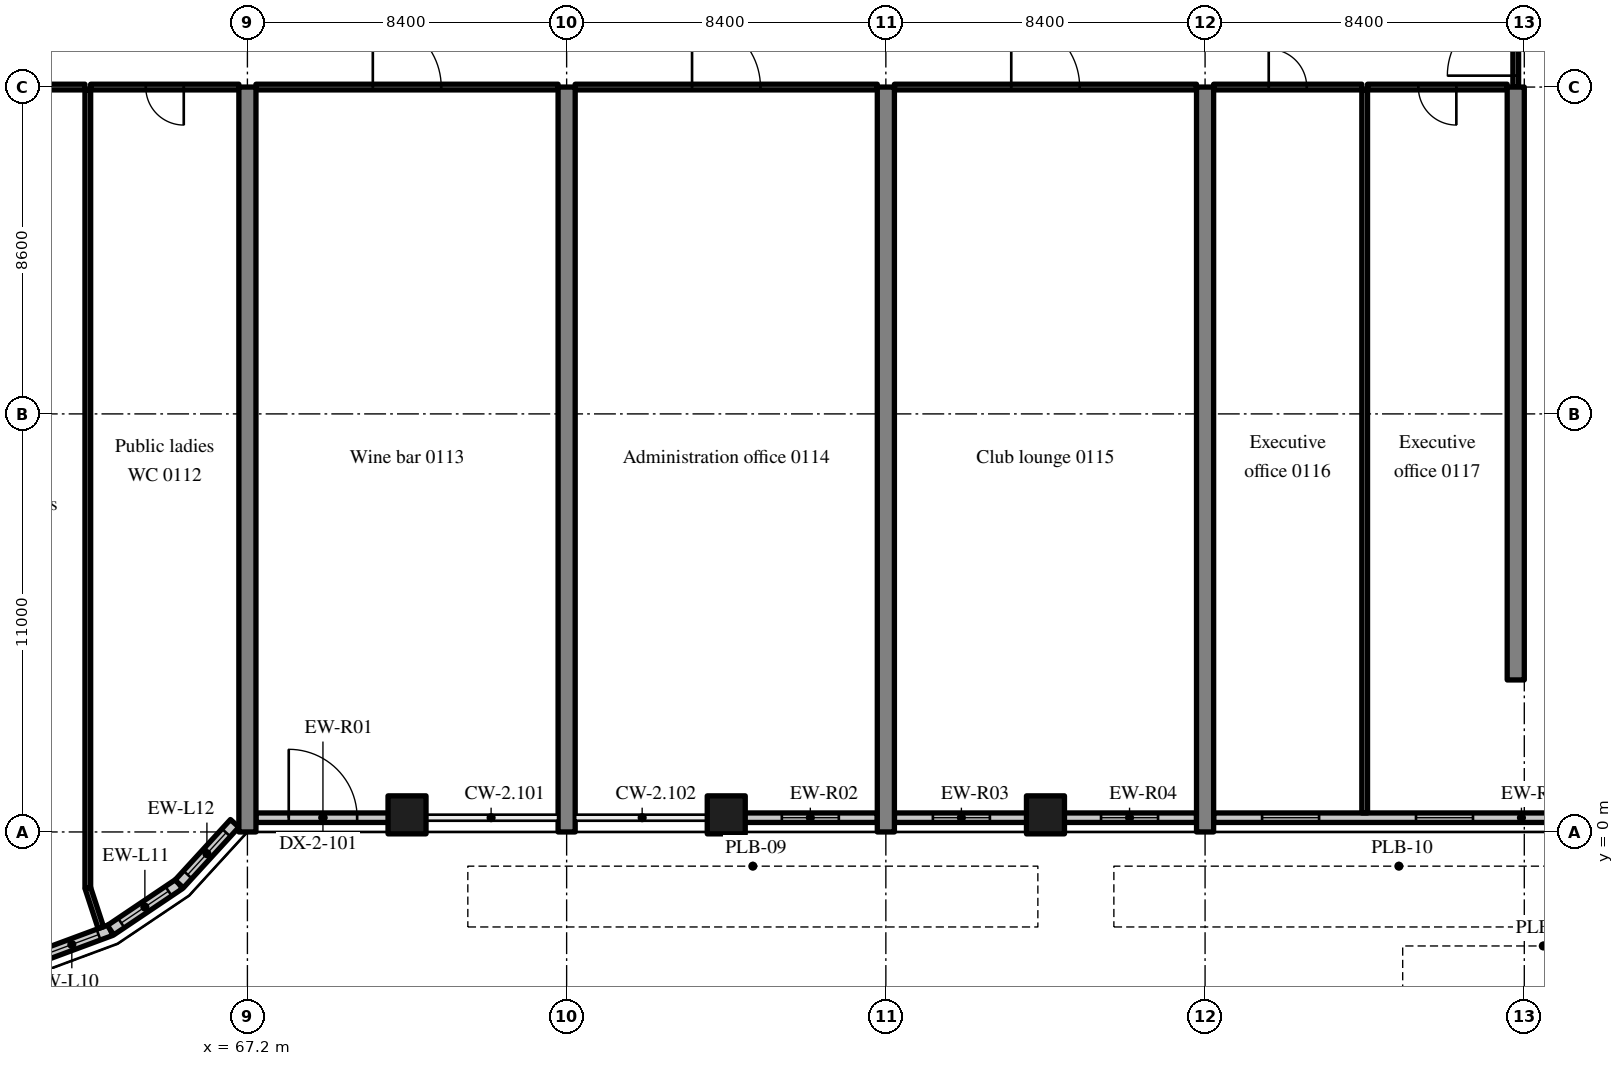
"""IFC4 building model, lengths in metres.
Left out: names, types, materials, properties, quantities, classifications, styles, units other than length and angle.
Written with IfcOpenShell. Run it as: python <this file> out.ifc"""

import sys

from ifc_helpers import new_model, si_unit, direction, frame, frame_2d, origin, origin_2d, place, context, subcontext, project, spatial, rectangle, extrude, source, transform, mapped, element, fill, save


model = new_model("IFC4")
c1 = context("Model", 3, precision=1e-05, world=origin(), true_north=direction((0.0, 1.0)))
c2 = subcontext(c1, "Body", "Model", "MODEL_VIEW")
j1 = project(units=[si_unit("LENGTHUNIT", "METRE"), si_unit("PLANEANGLEUNIT", "RADIAN")], contexts=[c1])
p1 = place(None, origin())
s1 = spatial("IfcSite", under=j1, at=p1, CompositionType="ELEMENT")
p2 = place(p1, origin())
s2 = spatial("IfcBuilding", under=s1, at=p2, CompositionType="ELEMENT")
p3 = place(p2, frame((0.0, 0.0, 6.0)))
s3 = spatial("IfcBuildingStorey", under=s2, at=p3, CompositionType="ELEMENT", Elevation=6.0)
m1 = source(origin(), c2, "Body", "SweptSolid", [
    extrude(rectangle(XDim=19.6, YDim=0.45, at=frame_2d((9.8, 0.0))), origin(), (0.0, 0.0, 1.0), 5.12),
])
for number, where, z_axis, x_axis in (
    (1, (67.2, 0.0, 0.0), (0.0, 0.0, 1.0), (0.0, 1.0, 0.0)),
    (2, (75.6, 0.0, 0.0), (0.0, 0.0, 1.0), (0.0, 1.0, 0.0)),
    (3, (84.0, 0.0, 0.0), (0.0, 0.0, 1.0), (0.0, 1.0, 0.0)),
    (4, (92.4, 0.0, 0.0), (0.0, 0.0, 1.0), (0.0, 1.0, 0.0)),
):
    element("IfcWall", number, at=place(p3, frame(where, z_axis=z_axis, x_axis=x_axis)), inside=s3, PredefinedType="SHEAR", context=c2, shape_type="MappedRepresentation", body=[
        mapped(m1, transform((0.0, 0.0, 0.0), scale=1.0)),
    ])
m2 = source(origin(), c2, "Body", "SweptSolid", [
    extrude(rectangle(XDim=15.6, YDim=0.45, at=frame_2d((7.8, 0.0))), origin(), (0.0, 0.0, 1.0), 5.12),
])
p4 = place(p3, frame((100.575, 4.0, 0.0), z_axis=(0.0, 0.0, 1.0), x_axis=(0.0, 1.0, 0.0)))
e5 = element("IfcWall", 5, at=p4, inside=s3, PredefinedType="SHEAR", context=c2, shape_type="MappedRepresentation", body=[
    mapped(m2, transform((0.0, 0.0, 0.0), scale=1.0)),
])
m3 = source(origin(), c2, "Body", "SweptSolid", [
    extrude(rectangle(XDim=1.0, YDim=1.0, at=origin_2d()), origin(), (0.0, 0.0, 1.0), 5.12),
])
for number, where, z_axis, x_axis in (
    (6, (71.4, 0.45, 0.0), (0.0, 0.0, 1.0), (1.0, 0.0, 0.0)),
    (7, (79.8, 0.45, 0.0), (0.0, 0.0, 1.0), (1.0, 0.0, 0.0)),
    (8, (88.2, 0.45, 0.0), (0.0, 0.0, 1.0), (1.0, 0.0, 0.0)),
):
    element("IfcColumn", number, at=place(p3, frame(where, z_axis=z_axis, x_axis=x_axis)), inside=s3, PredefinedType="COLUMN", context=c2, shape_type="MappedRepresentation", body=[
        mapped(m3, transform((0.0, 0.0, 0.0), scale=1.0)),
    ])
m4 = source(origin(), c2, "Body", "SweptSolid", [
    extrude(rectangle(XDim=2.176, YDim=0.3, at=frame_2d((1.088, 0.0))), origin(), (0.0, 0.0, 1.0), 5.12),
])
p5 = place(p3, frame((61.56, -3.34, 0.0), z_axis=(0.0, 0.0, 1.0), x_axis=(0.937531979054, 0.347899106424, 0.0)))
e9 = element("IfcWall", 9, at=p5, inside=s3, PredefinedType="SOLIDWALL", context=c2, shape_type="MappedRepresentation", body=[
    mapped(m4, transform((0.0, 0.0, 0.0), scale=1.0)),
])
m5 = source(origin(), c2, "Body", "SweptSolid", [
    extrude(rectangle(XDim=1.5, YDim=2.0, at=frame_2d((0.75, 1.0))), frame((0.0, 0.16, 0.0), z_axis=(0.0, -1.0, 0.0), x_axis=(1.0, 0.0, 0.0)), (0.0, 0.0, 1.0), 0.32),
])
p6 = place(p5, frame((0.338, 0.0, 0.9)))
e10 = element("IfcOpeningElement", 10, at=p6, cuts=e9, PredefinedType="OPENING", context=c2, shape_type="MappedRepresentation", body=[
    mapped(m5, transform((0.0, 0.0, 0.0), scale=1.0)),
])
m6 = source(origin(), c2, "Body", "SweptSolid", [
    extrude(rectangle(XDim=2.176, YDim=0.3, at=frame_2d((1.088, 0.0))), origin(), (0.0, 0.0, 1.0), 5.12),
])
p7 = place(p3, frame((63.599, -2.583, 0.0), z_axis=(0.0, 0.0, 1.0), x_axis=(0.829625727223, 0.558319937607, 0.0)))
e11 = element("IfcWall", 11, at=p7, inside=s3, PredefinedType="SOLIDWALL", context=c2, shape_type="MappedRepresentation", body=[
    mapped(m6, transform((0.0, 0.0, 0.0), scale=1.0)),
])
p8 = place(p7, frame((0.338, 0.0, 0.9)))
e12 = element("IfcOpeningElement", 12, at=p8, cuts=e11, PredefinedType="OPENING", context=c2, shape_type="MappedRepresentation", body=[
    mapped(m5, transform((0.0, 0.0, 0.0), scale=1.0)),
])
m7 = source(origin(), c2, "Body", "SweptSolid", [
    extrude(rectangle(XDim=2.162, YDim=0.3, at=frame_2d((1.081, 0.0))), origin(), (0.0, 0.0, 1.0), 5.12),
])
p9 = place(p3, frame((65.404, -1.369, 0.0), z_axis=(0.0, 0.0, 1.0), x_axis=(0.67537173084, 0.737477474355, 0.0)))
e13 = element("IfcWall", 13, at=p9, inside=s3, PredefinedType="SOLIDWALL", context=c2, shape_type="MappedRepresentation", body=[
    mapped(m7, transform((0.0, 0.0, 0.0), scale=1.0)),
])
p10 = place(p9, frame((0.331, 0.0, 0.9)))
e14 = element("IfcOpeningElement", 14, at=p10, cuts=e13, PredefinedType="OPENING", context=c2, shape_type="MappedRepresentation", body=[
    mapped(m5, transform((0.0, 0.0, 0.0), scale=1.0)),
])
m8 = source(origin(), c2, "Body", "SweptSolid", [
    extrude(rectangle(XDim=3.525, YDim=0.25, at=frame_2d((1.762, 0.0))), origin(), (0.0, 0.0, 1.0), 4.37),
])
p11 = place(p3, frame((67.425, 0.375, 0.0), z_axis=(0.0, 0.0, 1.0), x_axis=(1.0, 0.0, 0.0)))
e15 = element("IfcWall", 15, at=p11, inside=s3, PredefinedType="SOLIDWALL", context=c2, shape_type="MappedRepresentation", body=[
    mapped(m8, transform((0.0, 0.0, 0.0), scale=1.0)),
])
m9 = source(origin(), c2, "Body", "SweptSolid", [
    extrude(rectangle(XDim=1.8, YDim=2.4, at=frame_2d((0.9, 1.2))), frame((0.0, 0.135, 0.0), z_axis=(0.0, -1.0, 0.0), x_axis=(1.0, 0.0, 0.0)), (0.0, 0.0, 1.0), 0.27),
])
p12 = place(p11, frame((0.863, 0.0, 0.0)))
e16 = element("IfcOpeningElement", 16, at=p12, cuts=e15, PredefinedType="OPENING", context=c2, shape_type="MappedRepresentation", body=[
    mapped(m9, transform((0.0, 0.0, 0.0), scale=1.0)),
])
p13 = place(p3, frame((80.25, 0.375, 0.0), z_axis=(0.0, 0.0, 1.0), x_axis=(1.0, 0.0, 0.0)))
e17 = element("IfcWall", 17, at=p13, inside=s3, PredefinedType="SOLIDWALL", context=c2, shape_type="MappedRepresentation", body=[
    mapped(m8, transform((0.0, 0.0, 0.0), scale=1.0)),
])
m10 = source(origin(), c2, "Body", "SweptSolid", [
    extrude(rectangle(XDim=1.5, YDim=2.0, at=frame_2d((0.75, 1.0))), frame((0.0, 0.135, 0.0), z_axis=(0.0, -1.0, 0.0), x_axis=(1.0, 0.0, 0.0)), (0.0, 0.0, 1.0), 0.27),
])
p14 = place(p13, frame((1.012, 0.0, 0.9)))
e18 = element("IfcOpeningElement", 18, at=p14, cuts=e17, PredefinedType="OPENING", context=c2, shape_type="MappedRepresentation", body=[
    mapped(m10, transform((0.0, 0.0, 0.0), scale=1.0)),
])
p15 = place(p3, frame((84.225, 0.375, 0.0), z_axis=(0.0, 0.0, 1.0), x_axis=(1.0, 0.0, 0.0)))
e19 = element("IfcWall", 19, at=p15, inside=s3, PredefinedType="SOLIDWALL", context=c2, shape_type="MappedRepresentation", body=[
    mapped(m8, transform((0.0, 0.0, 0.0), scale=1.0)),
])
p16 = place(p15, frame((1.012, 0.0, 0.9)))
e20 = element("IfcOpeningElement", 20, at=p16, cuts=e19, PredefinedType="OPENING", context=c2, shape_type="MappedRepresentation", body=[
    mapped(m10, transform((0.0, 0.0, 0.0), scale=1.0)),
])
m11 = source(origin(), c2, "Body", "SweptSolid", [
    extrude(rectangle(XDim=3.525, YDim=0.25, at=frame_2d((1.763, 0.0))), origin(), (0.0, 0.0, 1.0), 4.37),
])
p17 = place(p3, frame((88.65, 0.375, 0.0), z_axis=(0.0, 0.0, 1.0), x_axis=(1.0, 0.0, 0.0)))
e21 = element("IfcWall", 21, at=p17, inside=s3, PredefinedType="SOLIDWALL", context=c2, shape_type="MappedRepresentation", body=[
    mapped(m11, transform((0.0, 0.0, 0.0), scale=1.0)),
])
p18 = place(p17, frame((1.012, 0.0, 0.9)))
e22 = element("IfcOpeningElement", 22, at=p18, cuts=e21, PredefinedType="OPENING", context=c2, shape_type="MappedRepresentation", body=[
    mapped(m10, transform((0.0, 0.0, 0.0), scale=1.0)),
])
m12 = source(origin(), c2, "Body", "SweptSolid", [
    extrude(rectangle(XDim=16.2, YDim=0.25, at=frame_2d((8.1, 0.0))), origin(), (0.0, 0.0, 1.0), 4.37),
])
p19 = place(p3, frame((92.625, 0.375, 0.0), z_axis=(0.0, 0.0, 1.0), x_axis=(1.0, 0.0, 0.0)))
e23 = element("IfcWall", 23, at=p19, inside=s3, PredefinedType="SOLIDWALL", context=c2, shape_type="MappedRepresentation", body=[
    mapped(m12, transform((0.0, 0.0, 0.0), scale=1.0)),
])
p20 = place(p19, frame((1.275, 0.0, 0.9)))
e24 = element("IfcOpeningElement", 24, at=p20, cuts=e23, PredefinedType="OPENING", context=c2, shape_type="MappedRepresentation", body=[
    mapped(m10, transform((0.0, 0.0, 0.0), scale=1.0)),
])
p21 = place(p19, frame((5.325, 0.0, 0.9)))
e25 = element("IfcOpeningElement", 25, at=p21, cuts=e23, PredefinedType="OPENING", context=c2, shape_type="MappedRepresentation", body=[
    mapped(m10, transform((0.0, 0.0, 0.0), scale=1.0)),
])
p22 = place(p19, frame((9.375, 0.0, 0.9)))
e26 = element("IfcOpeningElement", 26, at=p22, cuts=e23, PredefinedType="OPENING", context=c2, shape_type="MappedRepresentation", body=[
    mapped(m10, transform((0.0, 0.0, 0.0), scale=1.0)),
])
p23 = place(p19, frame((13.425, 0.0, 0.9)))
e27 = element("IfcOpeningElement", 27, at=p23, cuts=e23, PredefinedType="OPENING", context=c2, shape_type="MappedRepresentation", body=[
    mapped(m10, transform((0.0, 0.0, 0.0), scale=1.0)),
])
m13 = source(origin(), c2, "Body", "SweptSolid", [
    extrude(rectangle(XDim=3.9, YDim=0.15, at=frame_2d((1.95, 0.0))), origin(), (0.0, 0.0, 1.0), 4.42),
])
p24 = place(p3, frame((59.025, 19.6, 0.0), z_axis=(0.0, 0.0, 1.0), x_axis=(1.0, 0.0, 0.0)))
e28 = element("IfcWall", 28, at=p24, inside=s3, PredefinedType="PARTITIONING", context=c2, shape_type="MappedRepresentation", body=[
    mapped(m13, transform((0.0, 0.0, 0.0), scale=1.0)),
])
m14 = source(origin(), c2, "Body", "SweptSolid", [
    extrude(rectangle(XDim=1.0, YDim=2.1, at=frame_2d((0.5, 1.05))), frame((0.0, 0.085, 0.0), z_axis=(0.0, -1.0, 0.0), x_axis=(1.0, 0.0, 0.0)), (0.0, 0.0, 1.0), 0.17),
])
p25 = place(p24, frame((1.45, 0.0, 0.0)))
e29 = element("IfcOpeningElement", 29, at=p25, cuts=e28, PredefinedType="OPENING", context=c2, shape_type="MappedRepresentation", body=[
    mapped(m14, transform((0.0, 0.0, 0.0), scale=1.0)),
])
p26 = place(p3, frame((63.075, 19.6, 0.0), z_axis=(0.0, 0.0, 1.0), x_axis=(1.0, 0.0, 0.0)))
e30 = element("IfcWall", 30, at=p26, inside=s3, PredefinedType="PARTITIONING", context=c2, shape_type="MappedRepresentation", body=[
    mapped(m13, transform((0.0, 0.0, 0.0), scale=1.0)),
])
p27 = place(p26, frame((1.45, 0.0, 0.0)))
e31 = element("IfcOpeningElement", 31, at=p27, cuts=e30, PredefinedType="OPENING", context=c2, shape_type="MappedRepresentation", body=[
    mapped(m14, transform((0.0, 0.0, 0.0), scale=1.0)),
])
m15 = source(origin(), c2, "Body", "SweptSolid", [
    extrude(rectangle(XDim=20.998, YDim=0.15, at=frame_2d((10.499, 0.0))), origin(), (0.0, 0.0, 1.0), 5.12),
])
p28 = place(p3, frame((63.0, -1.473, 0.0), z_axis=(0.0, 0.0, 1.0), x_axis=(0.0, 1.0, 0.0)))
e32 = element("IfcWall", 32, at=p28, inside=s3, PredefinedType="PARTITIONING", context=c2, shape_type="MappedRepresentation", body=[
    mapped(m15, transform((0.0, 0.0, 0.0), scale=1.0)),
])
m16 = source(origin(), c2, "Body", "SweptSolid", [
    extrude(rectangle(XDim=7.95, YDim=0.15, at=frame_2d((3.975, 0.0))), origin(), (0.0, 0.0, 1.0), 4.42),
])
p29 = place(p3, frame((67.425, 19.6, 0.0), z_axis=(0.0, 0.0, 1.0), x_axis=(1.0, 0.0, 0.0)))
e33 = element("IfcWall", 33, at=p29, inside=s3, PredefinedType="PARTITIONING", context=c2, shape_type="MappedRepresentation", body=[
    mapped(m16, transform((0.0, 0.0, 0.0), scale=1.0)),
])
m17 = source(origin(), c2, "Body", "SweptSolid", [
    extrude(rectangle(XDim=1.8, YDim=2.1, at=frame_2d((0.9, 1.05))), frame((0.0, 0.085, 0.0), z_axis=(0.0, -1.0, 0.0), x_axis=(1.0, 0.0, 0.0)), (0.0, 0.0, 1.0), 0.17),
])
p30 = place(p29, frame((3.075, 0.0, 0.0)))
e34 = element("IfcOpeningElement", 34, at=p30, cuts=e33, PredefinedType="OPENING", context=c2, shape_type="MappedRepresentation", body=[
    mapped(m17, transform((0.0, 0.0, 0.0), scale=1.0)),
])
p31 = place(p3, frame((75.825, 19.6, 0.0), z_axis=(0.0, 0.0, 1.0), x_axis=(1.0, 0.0, 0.0)))
e35 = element("IfcWall", 35, at=p31, inside=s3, PredefinedType="PARTITIONING", context=c2, shape_type="MappedRepresentation", body=[
    mapped(m16, transform((0.0, 0.0, 0.0), scale=1.0)),
])
p32 = place(p31, frame((3.075, 0.0, 0.0)))
e36 = element("IfcOpeningElement", 36, at=p32, cuts=e35, PredefinedType="OPENING", context=c2, shape_type="MappedRepresentation", body=[
    mapped(m17, transform((0.0, 0.0, 0.0), scale=1.0)),
])
p33 = place(p3, frame((84.225, 19.6, 0.0), z_axis=(0.0, 0.0, 1.0), x_axis=(1.0, 0.0, 0.0)))
e37 = element("IfcWall", 37, at=p33, inside=s3, PredefinedType="PARTITIONING", context=c2, shape_type="MappedRepresentation", body=[
    mapped(m16, transform((0.0, 0.0, 0.0), scale=1.0)),
])
p34 = place(p33, frame((3.075, 0.0, 0.0)))
e38 = element("IfcOpeningElement", 38, at=p34, cuts=e37, PredefinedType="OPENING", context=c2, shape_type="MappedRepresentation", body=[
    mapped(m17, transform((0.0, 0.0, 0.0), scale=1.0)),
])
m18 = source(origin(), c2, "Body", "SweptSolid", [
    extrude(rectangle(XDim=3.9, YDim=0.15, at=frame_2d((1.95, 0.0))), origin(), (0.0, 0.0, 1.0), 4.42),
])
p35 = place(p3, frame((92.625, 19.6, 0.0), z_axis=(0.0, 0.0, 1.0), x_axis=(1.0, 0.0, 0.0)))
e39 = element("IfcWall", 39, at=p35, inside=s3, PredefinedType="PARTITIONING", context=c2, shape_type="MappedRepresentation", body=[
    mapped(m18, transform((0.0, 0.0, 0.0), scale=1.0)),
])
p36 = place(p35, frame((1.45, 0.0, 0.0)))
e40 = element("IfcOpeningElement", 40, at=p36, cuts=e39, PredefinedType="OPENING", context=c2, shape_type="MappedRepresentation", body=[
    mapped(m14, transform((0.0, 0.0, 0.0), scale=1.0)),
])
m19 = source(origin(), c2, "Body", "SweptSolid", [
    extrude(rectangle(XDim=3.675, YDim=0.15, at=frame_2d((1.837, 0.0))), origin(), (0.0, 0.0, 1.0), 4.42),
])
p37 = place(p3, frame((96.675, 19.6, 0.0), z_axis=(0.0, 0.0, 1.0), x_axis=(1.0, 0.0, 0.0)))
e41 = element("IfcWall", 41, at=p37, inside=s3, PredefinedType="PARTITIONING", context=c2, shape_type="MappedRepresentation", body=[
    mapped(m19, transform((0.0, 0.0, 0.0), scale=1.0)),
])
p38 = place(p37, frame((1.337, 0.0, 0.0)))
e42 = element("IfcOpeningElement", 42, at=p38, cuts=e41, PredefinedType="OPENING", context=c2, shape_type="MappedRepresentation", body=[
    mapped(m14, transform((0.0, 0.0, 0.0), scale=1.0)),
])
m20 = source(origin(), c2, "Body", "SweptSolid", [
    extrude(rectangle(XDim=19.025, YDim=0.15, at=frame_2d((9.512, 0.0))), origin(), (0.0, 0.0, 1.0), 5.12),
])
p39 = place(p3, frame((96.6, 0.5, 0.0), z_axis=(0.0, 0.0, 1.0), x_axis=(0.0, 1.0, 0.0)))
e43 = element("IfcWall", 43, at=p39, inside=s3, PredefinedType="PARTITIONING", context=c2, shape_type="MappedRepresentation", body=[
    mapped(m20, transform((0.0, 0.0, 0.0), scale=1.0)),
])
m21 = source(origin(), c2, "Body", "SweptSolid", [
    extrude(rectangle(XDim=2.4, YDim=0.15, at=frame_2d((1.2, 0.0))), origin(), (0.0, 0.0, 1.0), 4.22),
])
p40 = place(p3, frame((100.575, 19.6, 0.0), z_axis=(0.0, 0.0, 1.0), x_axis=(0.0, 1.0, 0.0)))
e44 = element("IfcWall", 44, at=p40, inside=s3, PredefinedType="PARTITIONING", context=c2, shape_type="MappedRepresentation", body=[
    mapped(m21, transform((0.0, 0.0, 0.0), scale=1.0)),
])
p41 = place(p40, frame((0.3, 0.0, 0.0)))
e45 = element("IfcOpeningElement", 45, at=p41, cuts=e44, PredefinedType="OPENING", context=c2, shape_type="MappedRepresentation", body=[
    mapped(m17, transform((0.0, 0.0, 0.0), scale=1.0)),
])
m22 = source(origin(), c2, "Body", "SweptSolid", [
    extrude(rectangle(XDim=1.101, YDim=0.15, at=frame_2d((0.55, 0.0))), origin(), (0.0, 0.0, 1.0), 5.12),
])
p42 = place(p3, frame((63.343, -2.519, 0.0), z_axis=(0.0, 0.0, 1.0), x_axis=(-0.311567081539, 0.950224159712, 0.0)))
e46 = element("IfcWall", 46, at=p42, inside=s3, PredefinedType="PARTITIONING", context=c2, shape_type="MappedRepresentation", body=[
    mapped(m22, transform((0.0, 0.0, 0.0), scale=1.0)),
])
m23 = source(origin(), c2, "Body", "SweptSolid", [
    extrude(rectangle(XDim=1.5, YDim=2.0, at=frame_2d((0.75, 1.0))), frame((0.0, 0.03, 0.0), z_axis=(0.0, -1.0, 0.0), x_axis=(1.0, 0.0, 0.0)), (0.0, 0.0, 1.0), 0.06),
])
p43 = place(p6, origin())
e47 = element("IfcWindow", 47, at=p43, inside=s3, PartitioningType="SINGLE_PANEL", PredefinedType="WINDOW", context=c2, shape_type="MappedRepresentation", body=[
    mapped(m23, transform((0.0, 0.0, 0.0), scale=1.0)),
])
fill(e10, e47)
p44 = place(p8, origin())
e48 = element("IfcWindow", 48, at=p44, inside=s3, PartitioningType="SINGLE_PANEL", PredefinedType="WINDOW", context=c2, shape_type="MappedRepresentation", body=[
    mapped(m23, transform((0.0, 0.0, 0.0), scale=1.0)),
])
fill(e12, e48)
p45 = place(p10, origin())
e49 = element("IfcWindow", 49, at=p45, inside=s3, PartitioningType="SINGLE_PANEL", PredefinedType="WINDOW", context=c2, shape_type="MappedRepresentation", body=[
    mapped(m23, transform((0.0, 0.0, 0.0), scale=1.0)),
])
fill(e14, e49)
m24 = source(origin(), c2, "Body", "SweptSolid", [
    extrude(rectangle(XDim=1.8, YDim=2.4, at=frame_2d((0.9, 1.2))), frame((0.0, 0.025, 0.0), z_axis=(0.0, -1.0, 0.0), x_axis=(1.0, 0.0, 0.0)), (0.0, 0.0, 1.0), 0.05),
])
p46 = place(p12, origin())
e50 = element("IfcDoor", 50, at=p46, inside=s3, OperationType="DOUBLE_DOOR_SINGLE_SWING", PredefinedType="DOOR", context=c2, shape_type="MappedRepresentation", body=[
    mapped(m24, transform((0.0, 0.0, 0.0), scale=1.0)),
])
fill(e16, e50)
p47 = place(p14, origin())
e51 = element("IfcWindow", 51, at=p47, inside=s3, PartitioningType="SINGLE_PANEL", PredefinedType="WINDOW", context=c2, shape_type="MappedRepresentation", body=[
    mapped(m23, transform((0.0, 0.0, 0.0), scale=1.0)),
])
fill(e18, e51)
p48 = place(p16, origin())
e52 = element("IfcWindow", 52, at=p48, inside=s3, PartitioningType="SINGLE_PANEL", PredefinedType="WINDOW", context=c2, shape_type="MappedRepresentation", body=[
    mapped(m23, transform((0.0, 0.0, 0.0), scale=1.0)),
])
fill(e20, e52)
p49 = place(p18, origin())
e53 = element("IfcWindow", 53, at=p49, inside=s3, PartitioningType="SINGLE_PANEL", PredefinedType="WINDOW", context=c2, shape_type="MappedRepresentation", body=[
    mapped(m23, transform((0.0, 0.0, 0.0), scale=1.0)),
])
fill(e22, e53)
p50 = place(p20, origin())
e54 = element("IfcWindow", 54, at=p50, inside=s3, PartitioningType="SINGLE_PANEL", PredefinedType="WINDOW", context=c2, shape_type="MappedRepresentation", body=[
    mapped(m23, transform((0.0, 0.0, 0.0), scale=1.0)),
])
fill(e24, e54)
p51 = place(p21, origin())
e55 = element("IfcWindow", 55, at=p51, inside=s3, PartitioningType="SINGLE_PANEL", PredefinedType="WINDOW", context=c2, shape_type="MappedRepresentation", body=[
    mapped(m23, transform((0.0, 0.0, 0.0), scale=1.0)),
])
fill(e25, e55)
m25 = source(origin(), c2, "Body", "SweptSolid", [
    extrude(rectangle(XDim=1.0, YDim=2.1, at=frame_2d((0.5, 1.05))), frame((0.0, 0.025, 0.0), z_axis=(0.0, -1.0, 0.0), x_axis=(1.0, 0.0, 0.0)), (0.0, 0.0, 1.0), 0.05),
])
p52 = place(p27, origin())
e56 = element("IfcDoor", 56, at=p52, inside=s3, OperationType="SINGLE_SWING_RIGHT", PredefinedType="DOOR", context=c2, shape_type="MappedRepresentation", body=[
    mapped(m25, transform((0.0, 0.0, 0.0), scale=1.0)),
])
fill(e31, e56)
m26 = source(origin(), c2, "Body", "SweptSolid", [
    extrude(rectangle(XDim=1.8, YDim=2.1, at=frame_2d((0.9, 1.05))), frame((0.0, 0.025, 0.0), z_axis=(0.0, -1.0, 0.0), x_axis=(1.0, 0.0, 0.0)), (0.0, 0.0, 1.0), 0.05),
])
p53 = place(p30, origin())
e57 = element("IfcDoor", 57, at=p53, inside=s3, OperationType="DOUBLE_DOOR_SINGLE_SWING", PredefinedType="DOOR", context=c2, shape_type="MappedRepresentation", body=[
    mapped(m26, transform((0.0, 0.0, 0.0), scale=1.0)),
])
fill(e34, e57)
p54 = place(p32, origin())
e58 = element("IfcDoor", 58, at=p54, inside=s3, OperationType="DOUBLE_DOOR_SINGLE_SWING", PredefinedType="DOOR", context=c2, shape_type="MappedRepresentation", body=[
    mapped(m26, transform((0.0, 0.0, 0.0), scale=1.0)),
])
fill(e36, e58)
p55 = place(p34, origin())
e59 = element("IfcDoor", 59, at=p55, inside=s3, OperationType="DOUBLE_DOOR_SINGLE_SWING", PredefinedType="DOOR", context=c2, shape_type="MappedRepresentation", body=[
    mapped(m26, transform((0.0, 0.0, 0.0), scale=1.0)),
])
fill(e38, e59)
p56 = place(p36, origin())
e60 = element("IfcDoor", 60, at=p56, inside=s3, OperationType="SINGLE_SWING_LEFT", PredefinedType="DOOR", context=c2, shape_type="MappedRepresentation", body=[
    mapped(m25, transform((0.0, 0.0, 0.0), scale=1.0)),
])
fill(e40, e60)
p57 = place(p38, origin())
e61 = element("IfcDoor", 61, at=p57, inside=s3, OperationType="SINGLE_SWING_RIGHT", PredefinedType="DOOR", context=c2, shape_type="MappedRepresentation", body=[
    mapped(m25, transform((0.0, 0.0, 0.0), scale=1.0)),
])
fill(e42, e61)
p58 = place(p41, origin())
e62 = element("IfcDoor", 62, at=p58, inside=s3, OperationType="DOUBLE_DOOR_SINGLE_SWING", PredefinedType="DOOR", context=c2, shape_type="MappedRepresentation", body=[
    mapped(m26, transform((0.0, 0.0, 0.0), scale=1.0)),
])
fill(e45, e62)
save(model, sys.argv[1])
